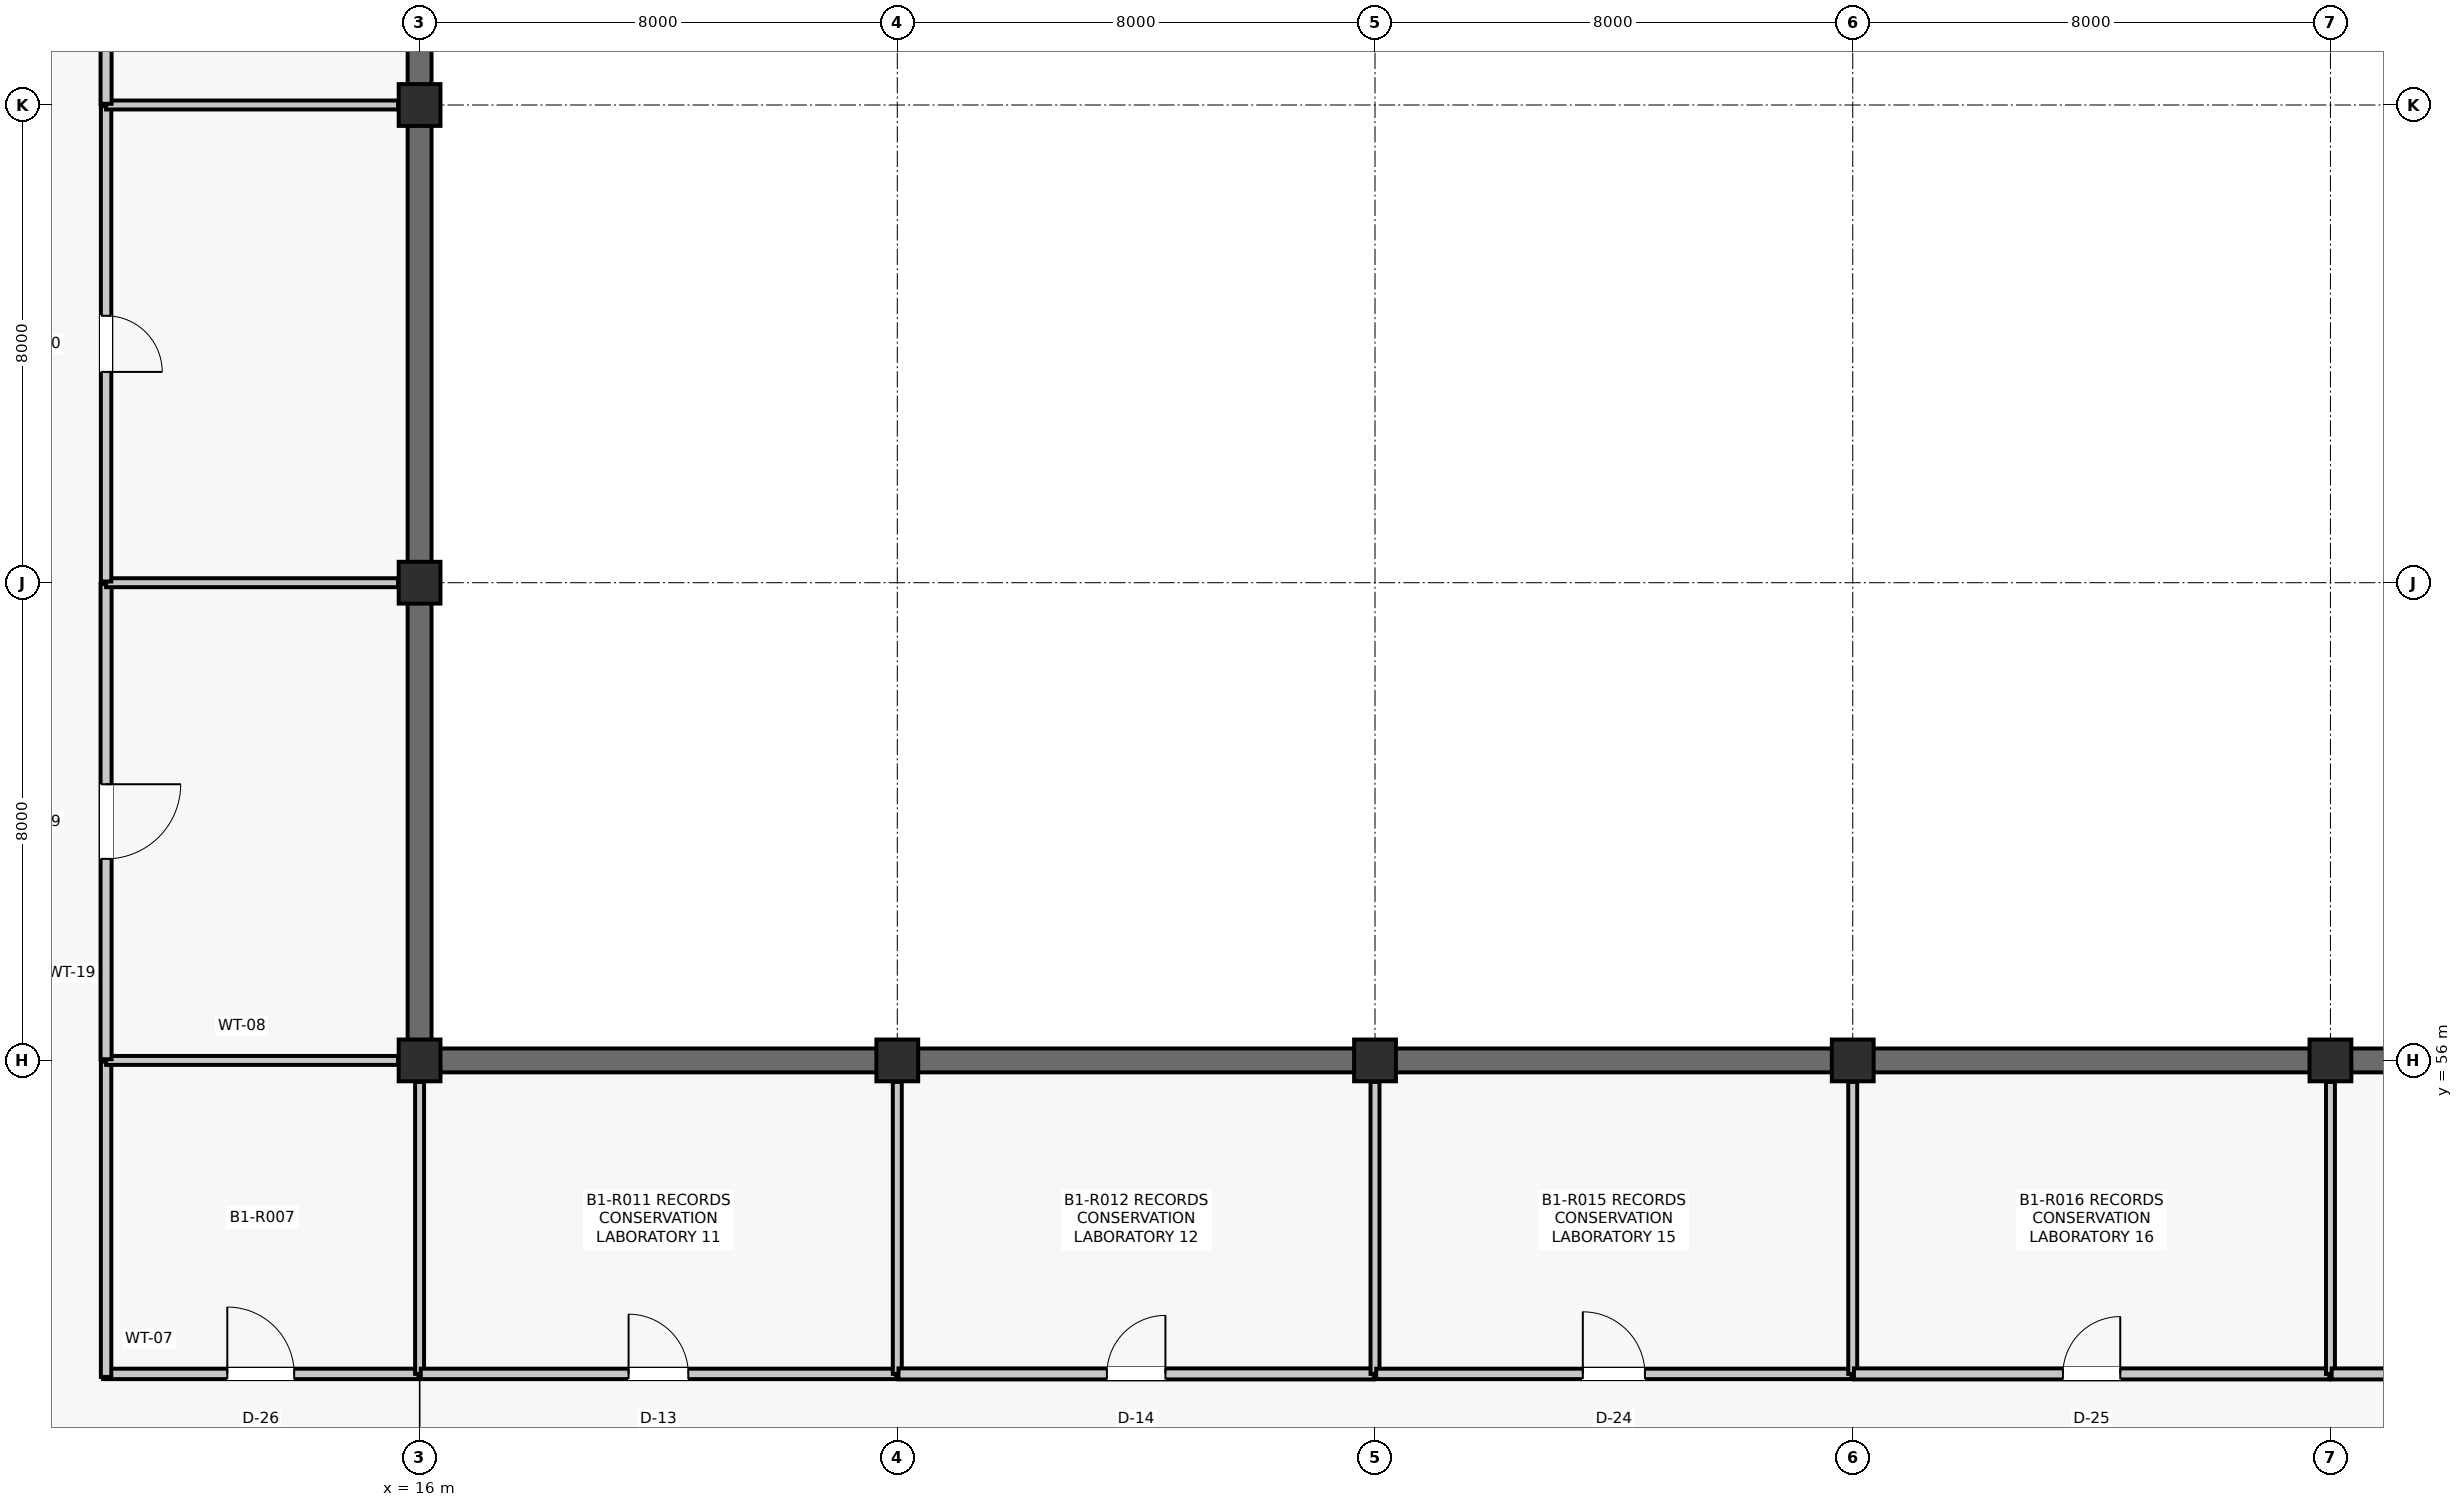
"""IFC4 building model, lengths in metres.
Left out: names, types, materials, properties, quantities, classifications, styles, units other than length and angle.
Written with IfcOpenShell. Run it as: python <this file> out.ifc"""

import sys

from ifc_helpers import new_model, si_unit, direction, frame, frame_2d, origin, origin_2d, place, context, subcontext, project, spatial, rectangle, extrude, element, fill, save


model = new_model("IFC4")
c1 = context("Model", 3, precision=1e-05, world=origin(), true_north=direction((0.0, 1.0)))
c2 = subcontext(c1, "Body", "Model", "MODEL_VIEW")
j1 = project(units=[si_unit("LENGTHUNIT", "METRE"), si_unit("PLANEANGLEUNIT", "RADIAN")], contexts=[c1])
p1 = place(None, origin())
s1 = spatial("IfcSite", under=j1, at=p1, CompositionType="ELEMENT")
p2 = place(p1, origin())
s2 = spatial("IfcBuilding", under=s1, at=p2, CompositionType="ELEMENT")
p3 = place(p2, frame((0.0, 0.0, -4.29)))
s3 = spatial("IfcBuildingStorey", under=s2, at=p3, CompositionType="ELEMENT", Elevation=-4.29)
for number, where, z_axis, x_axis in (
    (1, (16.0, 56.0, 0.0), (0.0, 0.0, 1.0), (1.0, 0.0, 0.0)),
    (2, (16.0, 64.0, 0.0), (0.0, 0.0, 1.0), (1.0, 0.0, 0.0)),
    (3, (16.0, 72.0, 0.0), (0.0, 0.0, 1.0), (1.0, 0.0, 0.0)),
    (4, (24.0, 56.0, 0.0), (0.0, 0.0, 1.0), (1.0, 0.0, 0.0)),
    (5, (32.0, 56.0, 0.0), (0.0, 0.0, 1.0), (1.0, 0.0, 0.0)),
    (6, (40.0, 56.0, 0.0), (0.0, 0.0, 1.0), (1.0, 0.0, 0.0)),
    (7, (48.0, 56.0, 0.0), (0.0, 0.0, 1.0), (1.0, 0.0, 0.0)),
):
    element("IfcColumn", number, at=place(p3, frame(where, z_axis=z_axis, x_axis=x_axis)), inside=s3, PredefinedType="COLUMN", context=c2, shape_type="SweptSolid", body=[
        extrude(rectangle(XDim=0.7, YDim=0.7, at=origin_2d()), origin(), (0.0, 0.0, 1.0), 4.29),
    ])
p4 = place(p3, frame((16.0, 56.335, 0.0), z_axis=(0.0, 0.0, 1.0), x_axis=(0.0, 1.0, 0.0)))
e8 = element("IfcWall", 8, at=p4, inside=s3, PredefinedType="SHEAR", context=c2, shape_type="SweptSolid", body=[
    extrude(rectangle(XDim=7.33, YDim=0.4, at=frame_2d((3.665, 0.0))), origin(), (0.0, 0.0, 1.0), 3.6),
])
p5 = place(p3, frame((16.0, 64.335, 0.0), z_axis=(0.0, 0.0, 1.0), x_axis=(0.0, 1.0, 0.0)))
e9 = element("IfcWall", 9, at=p5, inside=s3, PredefinedType="SHEAR", context=c2, shape_type="SweptSolid", body=[
    extrude(rectangle(XDim=7.33, YDim=0.4, at=frame_2d((3.665, 0.0))), origin(), (0.0, 0.0, 1.0), 3.664),
])
p6 = place(p3, frame((16.0, 72.335, 0.0), z_axis=(0.0, 0.0, 1.0), x_axis=(0.0, 1.0, 0.0)))
e10 = element("IfcWall", 10, at=p6, inside=s3, PredefinedType="SHEAR", context=c2, shape_type="SweptSolid", body=[
    extrude(rectangle(XDim=7.33, YDim=0.4, at=frame_2d((3.665, 0.0))), origin(), (0.0, 0.0, 1.0), 3.604),
])
p7 = place(p3, frame((16.335, 56.0, 0.0), z_axis=(0.0, 0.0, 1.0), x_axis=(1.0, 0.0, 0.0)))
e11 = element("IfcWall", 11, at=p7, inside=s3, PredefinedType="SHEAR", context=c2, shape_type="SweptSolid", body=[
    extrude(rectangle(XDim=7.33, YDim=0.4, at=frame_2d((3.665, 0.0))), origin(), (0.0, 0.0, 1.0), 3.6),
])
p8 = place(p3, frame((24.335, 56.0, 0.0), z_axis=(0.0, 0.0, 1.0), x_axis=(1.0, 0.0, 0.0)))
e12 = element("IfcWall", 12, at=p8, inside=s3, PredefinedType="SHEAR", context=c2, shape_type="SweptSolid", body=[
    extrude(rectangle(XDim=7.33, YDim=0.4, at=frame_2d((3.665, 0.0))), origin(), (0.0, 0.0, 1.0), 3.664),
])
p9 = place(p3, frame((32.335, 56.0, 0.0), z_axis=(0.0, 0.0, 1.0), x_axis=(1.0, 0.0, 0.0)))
e13 = element("IfcWall", 13, at=p9, inside=s3, PredefinedType="SHEAR", context=c2, shape_type="SweptSolid", body=[
    extrude(rectangle(XDim=7.33, YDim=0.4, at=frame_2d((3.665, 0.0))), origin(), (0.0, 0.0, 1.0), 3.604),
])
p10 = place(p3, frame((40.335, 56.0, 0.0), z_axis=(0.0, 0.0, 1.0), x_axis=(1.0, 0.0, 0.0)))
e14 = element("IfcWall", 14, at=p10, inside=s3, PredefinedType="SHEAR", context=c2, shape_type="SweptSolid", body=[
    extrude(rectangle(XDim=7.33, YDim=0.4, at=frame_2d((3.665, 0.0))), origin(), (0.0, 0.0, 1.0), 3.667),
])
p11 = place(p3, frame((48.335, 56.0, 0.0), z_axis=(0.0, 0.0, 1.0), x_axis=(1.0, 0.0, 0.0)))
e15 = element("IfcWall", 15, at=p11, inside=s3, PredefinedType="SHEAR", context=c2, shape_type="SweptSolid", body=[
    extrude(rectangle(XDim=7.33, YDim=0.4, at=frame_2d((3.665, 0.0))), origin(), (0.0, 0.0, 1.0), 3.6),
])
p12 = place(p3, frame((10.7, 50.75, 0.0), z_axis=(0.0, 0.0, 1.0), x_axis=(1.0, 0.0, 0.0)))
e16 = element("IfcWall", 16, at=p12, inside=s3, PredefinedType="PARTITIONING", context=c2, shape_type="SweptSolid", body=[
    extrude(rectangle(XDim=5.28, YDim=0.175, at=frame_2d((2.64, 0.0))), origin(), (0.0, 0.0, 1.0), 3.393),
])
p13 = place(p12, frame((2.08, 0.0, 0.0)))
e17 = element("IfcOpeningElement", 17, at=p13, cuts=e16, PredefinedType="OPENING", context=c2, shape_type="SweptSolid", body=[
    extrude(rectangle(XDim=1.12, YDim=2.22, at=frame_2d((0.56, 1.11))), frame((0.0, 0.097, 0.0), z_axis=(0.0, -1.0, 0.0), x_axis=(1.0, 0.0, 0.0)), (0.0, 0.0, 1.0), 0.195),
])
p14 = place(p3, frame((10.75, 50.7, 0.0), z_axis=(0.0, 0.0, 1.0), x_axis=(0.0, 1.0, 0.0)))
e18 = element("IfcWall", 18, at=p14, inside=s3, PredefinedType="PARTITIONING", context=c2, shape_type="SweptSolid", body=[
    extrude(rectangle(XDim=5.28, YDim=0.175, at=frame_2d((2.64, 0.0))), origin(), (0.0, 0.0, 1.0), 3.317),
])
p15 = place(p3, frame((10.75, 56.0, 0.0), z_axis=(0.0, 0.0, 1.0), x_axis=(1.0, 0.0, 0.0)))
e19 = element("IfcWall", 19, at=p15, inside=s3, PredefinedType="PARTITIONING", context=c2, shape_type="SweptSolid", body=[
    extrude(rectangle(XDim=4.89, YDim=0.15, at=frame_2d((2.445, 0.0))), origin(), (0.0, 0.0, 1.0), 3.317),
])
p16 = place(p3, frame((16.0, 50.75, 0.0), z_axis=(0.0, 0.0, 1.0), x_axis=(0.0, 1.0, 0.0)))
e20 = element("IfcWall", 20, at=p16, inside=s3, PredefinedType="PARTITIONING", context=c2, shape_type="SweptSolid", body=[
    extrude(rectangle(XDim=4.89, YDim=0.15, at=frame_2d((2.445, 0.0))), origin(), (0.0, 0.0, 1.0), 3.393),
])
p17 = place(p3, frame((10.75, 56.02, 0.0), z_axis=(0.0, 0.0, 1.0), x_axis=(0.0, 1.0, 0.0)))
e21 = element("IfcWall", 21, at=p17, inside=s3, PredefinedType="PARTITIONING", context=c2, shape_type="SweptSolid", body=[
    extrude(rectangle(XDim=7.96, YDim=0.185, at=frame_2d((3.98, 0.0))), origin(), (0.0, 0.0, 1.0), 3.317),
])
p18 = place(p17, frame((3.355, 0.0, 0.0)))
e22 = element("IfcOpeningElement", 22, at=p18, cuts=e21, PredefinedType="OPENING", context=c2, shape_type="SweptSolid", body=[
    extrude(rectangle(XDim=1.25, YDim=2.18, at=frame_2d((0.625, 1.09))), frame((0.0, 0.103, 0.0), z_axis=(0.0, -1.0, 0.0), x_axis=(1.0, 0.0, 0.0)), (0.0, 0.0, 1.0), 0.205),
])
p19 = place(p3, frame((10.75, 64.0, 0.0), z_axis=(0.0, 0.0, 1.0), x_axis=(1.0, 0.0, 0.0)))
e23 = element("IfcWall", 23, at=p19, inside=s3, PredefinedType="PARTITIONING", context=c2, shape_type="SweptSolid", body=[
    extrude(rectangle(XDim=4.89, YDim=0.15, at=frame_2d((2.445, 0.0))), origin(), (0.0, 0.0, 1.0), 3.393),
])
p20 = place(p3, frame((10.75, 64.02, 0.0), z_axis=(0.0, 0.0, 1.0), x_axis=(0.0, 1.0, 0.0)))
e24 = element("IfcWall", 24, at=p20, inside=s3, PredefinedType="PARTITIONING", context=c2, shape_type="SweptSolid", body=[
    extrude(rectangle(XDim=7.96, YDim=0.175, at=frame_2d((3.98, 0.0))), origin(), (0.0, 0.0, 1.0), 3.326),
])
p21 = place(p20, frame((3.51, 0.0, 0.0)))
e25 = element("IfcOpeningElement", 25, at=p21, cuts=e24, PredefinedType="OPENING", context=c2, shape_type="SweptSolid", body=[
    extrude(rectangle(XDim=0.94, YDim=2.12, at=frame_2d((0.47, 1.06))), frame((0.0, 0.097, 0.0), z_axis=(0.0, -1.0, 0.0), x_axis=(1.0, 0.0, 0.0)), (0.0, 0.0, 1.0), 0.195),
])
p22 = place(p3, frame((10.75, 72.0, 0.0), z_axis=(0.0, 0.0, 1.0), x_axis=(1.0, 0.0, 0.0)))
e26 = element("IfcWall", 26, at=p22, inside=s3, PredefinedType="PARTITIONING", context=c2, shape_type="SweptSolid", body=[
    extrude(rectangle(XDim=4.89, YDim=0.15, at=frame_2d((2.445, 0.0))), origin(), (0.0, 0.0, 1.0), 3.326),
])
p23 = place(p3, frame((10.75, 72.02, 0.0), z_axis=(0.0, 0.0, 1.0), x_axis=(0.0, 1.0, 0.0)))
e27 = element("IfcWall", 27, at=p23, inside=s3, PredefinedType="PARTITIONING", context=c2, shape_type="SweptSolid", body=[
    extrude(rectangle(XDim=7.96, YDim=0.185, at=frame_2d((3.98, 0.0))), origin(), (0.0, 0.0, 1.0), 3.326),
])
p24 = place(p23, frame((3.455, 0.0, 0.0)))
e28 = element("IfcOpeningElement", 28, at=p24, cuts=e27, PredefinedType="OPENING", context=c2, shape_type="SweptSolid", body=[
    extrude(rectangle(XDim=1.05, YDim=2.15, at=frame_2d((0.525, 1.075))), frame((0.0, 0.103, 0.0), z_axis=(0.0, -1.0, 0.0), x_axis=(1.0, 0.0, 0.0)), (0.0, 0.0, 1.0), 0.205),
])
p25 = place(p3, frame((16.02, 50.75, 0.0), z_axis=(0.0, 0.0, 1.0), x_axis=(1.0, 0.0, 0.0)))
e29 = element("IfcWall", 29, at=p25, inside=s3, PredefinedType="PARTITIONING", context=c2, shape_type="SweptSolid", body=[
    extrude(rectangle(XDim=7.96, YDim=0.175, at=frame_2d((3.98, 0.0))), origin(), (0.0, 0.0, 1.0), 3.393),
])
p26 = place(p25, frame((3.48, 0.0, 0.0)))
e30 = element("IfcOpeningElement", 30, at=p26, cuts=e29, PredefinedType="OPENING", context=c2, shape_type="SweptSolid", body=[
    extrude(rectangle(XDim=1.0, YDim=2.15, at=frame_2d((0.5, 1.075))), frame((0.0, 0.097, 0.0), z_axis=(0.0, -1.0, 0.0), x_axis=(1.0, 0.0, 0.0)), (0.0, 0.0, 1.0), 0.195),
])
p27 = place(p3, frame((24.0, 50.75, 0.0), z_axis=(0.0, 0.0, 1.0), x_axis=(0.0, 1.0, 0.0)))
e31 = element("IfcWall", 31, at=p27, inside=s3, PredefinedType="PARTITIONING", context=c2, shape_type="SweptSolid", body=[
    extrude(rectangle(XDim=4.89, YDim=0.15, at=frame_2d((2.445, 0.0))), origin(), (0.0, 0.0, 1.0), 3.402),
])
p28 = place(p3, frame((24.02, 50.75, 0.0), z_axis=(0.0, 0.0, 1.0), x_axis=(1.0, 0.0, 0.0)))
e32 = element("IfcWall", 32, at=p28, inside=s3, PredefinedType="PARTITIONING", context=c2, shape_type="SweptSolid", body=[
    extrude(rectangle(XDim=7.96, YDim=0.185, at=frame_2d((3.98, 0.0))), origin(), (0.0, 0.0, 1.0), 3.394),
])
p29 = place(p28, frame((3.49, 0.0, 0.0)))
e33 = element("IfcOpeningElement", 33, at=p29, cuts=e32, PredefinedType="OPENING", context=c2, shape_type="SweptSolid", body=[
    extrude(rectangle(XDim=0.98, YDim=2.15, at=frame_2d((0.49, 1.075))), frame((0.0, 0.103, 0.0), z_axis=(0.0, -1.0, 0.0), x_axis=(1.0, 0.0, 0.0)), (0.0, 0.0, 1.0), 0.205),
])
p30 = place(p3, frame((32.0, 50.75, 0.0), z_axis=(0.0, 0.0, 1.0), x_axis=(0.0, 1.0, 0.0)))
e34 = element("IfcWall", 34, at=p30, inside=s3, PredefinedType="PARTITIONING", context=c2, shape_type="SweptSolid", body=[
    extrude(rectangle(XDim=4.89, YDim=0.15, at=frame_2d((2.445, 0.0))), origin(), (0.0, 0.0, 1.0), 3.394),
])
p31 = place(p3, frame((32.02, 50.75, 0.0), z_axis=(0.0, 0.0, 1.0), x_axis=(1.0, 0.0, 0.0)))
e35 = element("IfcWall", 35, at=p31, inside=s3, PredefinedType="PARTITIONING", context=c2, shape_type="SweptSolid", body=[
    extrude(rectangle(XDim=7.96, YDim=0.175, at=frame_2d((3.98, 0.0))), origin(), (0.0, 0.0, 1.0), 3.394),
])
p32 = place(p31, frame((3.46, 0.0, 0.0)))
e36 = element("IfcOpeningElement", 36, at=p32, cuts=e35, PredefinedType="OPENING", context=c2, shape_type="SweptSolid", body=[
    extrude(rectangle(XDim=1.04, YDim=2.18, at=frame_2d((0.52, 1.09))), frame((0.0, 0.097, 0.0), z_axis=(0.0, -1.0, 0.0), x_axis=(1.0, 0.0, 0.0)), (0.0, 0.0, 1.0), 0.195),
])
p33 = place(p3, frame((40.0, 50.75, 0.0), z_axis=(0.0, 0.0, 1.0), x_axis=(0.0, 1.0, 0.0)))
e37 = element("IfcWall", 37, at=p33, inside=s3, PredefinedType="PARTITIONING", context=c2, shape_type="SweptSolid", body=[
    extrude(rectangle(XDim=4.89, YDim=0.15, at=frame_2d((2.445, 0.0))), origin(), (0.0, 0.0, 1.0), 3.461),
])
p34 = place(p3, frame((40.02, 50.75, 0.0), z_axis=(0.0, 0.0, 1.0), x_axis=(1.0, 0.0, 0.0)))
e38 = element("IfcWall", 38, at=p34, inside=s3, PredefinedType="PARTITIONING", context=c2, shape_type="SweptSolid", body=[
    extrude(rectangle(XDim=7.96, YDim=0.185, at=frame_2d((3.98, 0.0))), origin(), (0.0, 0.0, 1.0), 3.393),
])
p35 = place(p34, frame((3.5, 0.0, 0.0)))
e39 = element("IfcOpeningElement", 39, at=p35, cuts=e38, PredefinedType="OPENING", context=c2, shape_type="SweptSolid", body=[
    extrude(rectangle(XDim=0.96, YDim=2.14, at=frame_2d((0.48, 1.07))), frame((0.0, 0.103, 0.0), z_axis=(0.0, -1.0, 0.0), x_axis=(1.0, 0.0, 0.0)), (0.0, 0.0, 1.0), 0.205),
])
p36 = place(p3, frame((48.0, 50.75, 0.0), z_axis=(0.0, 0.0, 1.0), x_axis=(0.0, 1.0, 0.0)))
e40 = element("IfcWall", 40, at=p36, inside=s3, PredefinedType="PARTITIONING", context=c2, shape_type="SweptSolid", body=[
    extrude(rectangle(XDim=4.89, YDim=0.15, at=frame_2d((2.445, 0.0))), origin(), (0.0, 0.0, 1.0), 3.393),
])
p37 = place(p3, frame((48.02, 50.75, 0.0), z_axis=(0.0, 0.0, 1.0), x_axis=(1.0, 0.0, 0.0)))
e41 = element("IfcWall", 41, at=p37, inside=s3, PredefinedType="PARTITIONING", context=c2, shape_type="SweptSolid", body=[
    extrude(rectangle(XDim=7.96, YDim=0.185, at=frame_2d((3.98, 0.0))), origin(), (0.0, 0.0, 1.0), 3.393),
])
p38 = place(p37, frame((3.355, 0.0, 0.0)))
e42 = element("IfcOpeningElement", 42, at=p38, cuts=e41, PredefinedType="OPENING", context=c2, shape_type="SweptSolid", body=[
    extrude(rectangle(XDim=1.25, YDim=2.18, at=frame_2d((0.625, 1.09))), frame((0.0, 0.103, 0.0), z_axis=(0.0, -1.0, 0.0), x_axis=(1.0, 0.0, 0.0)), (0.0, 0.0, 1.0), 0.205),
])
p39 = place(p13, origin())
e43 = element("IfcDoor", 43, at=p39, inside=s3, OperationType="SINGLE_SWING_LEFT", PredefinedType="DOOR", context=c2, shape_type="SweptSolid", body=[
    extrude(rectangle(XDim=1.12, YDim=2.22, at=frame_2d((0.56, 1.11))), frame((0.0, 0.025, 0.0), z_axis=(0.0, -1.0, 0.0), x_axis=(1.0, 0.0, 0.0)), (0.0, 0.0, 1.0), 0.05),
])
fill(e17, e43)
p40 = place(p18, frame((1.25, 0.0, 0.0), z_axis=(0.0, 0.0, 1.0), x_axis=(-1.0, 0.0, 0.0)))
e44 = element("IfcDoor", 44, at=p40, inside=s3, OperationType="SINGLE_SWING_RIGHT", PredefinedType="DOOR", context=c2, shape_type="SweptSolid", body=[
    extrude(rectangle(XDim=1.25, YDim=2.18, at=frame_2d((0.625, 1.09))), frame((0.0, 0.025, 0.0), z_axis=(0.0, -1.0, 0.0), x_axis=(1.0, 0.0, 0.0)), (0.0, 0.0, 1.0), 0.05),
])
fill(e22, e44)
p41 = place(p21, frame((0.94, 0.0, 0.0), z_axis=(0.0, 0.0, 1.0), x_axis=(-1.0, 0.0, 0.0)))
e45 = element("IfcDoor", 45, at=p41, inside=s3, OperationType="SINGLE_SWING_LEFT", PredefinedType="DOOR", context=c2, shape_type="SweptSolid", body=[
    extrude(rectangle(XDim=0.94, YDim=2.12, at=frame_2d((0.47, 1.06))), frame((0.0, 0.025, 0.0), z_axis=(0.0, -1.0, 0.0), x_axis=(1.0, 0.0, 0.0)), (0.0, 0.0, 1.0), 0.05),
])
fill(e25, e45)
p42 = place(p26, origin())
e46 = element("IfcDoor", 46, at=p42, inside=s3, OperationType="SINGLE_SWING_LEFT", PredefinedType="DOOR", context=c2, shape_type="SweptSolid", body=[
    extrude(rectangle(XDim=1.0, YDim=2.15, at=frame_2d((0.5, 1.075))), frame((0.0, 0.025, 0.0), z_axis=(0.0, -1.0, 0.0), x_axis=(1.0, 0.0, 0.0)), (0.0, 0.0, 1.0), 0.05),
])
fill(e30, e46)
p43 = place(p29, origin())
e47 = element("IfcDoor", 47, at=p43, inside=s3, OperationType="SINGLE_SWING_RIGHT", PredefinedType="DOOR", context=c2, shape_type="SweptSolid", body=[
    extrude(rectangle(XDim=0.98, YDim=2.15, at=frame_2d((0.49, 1.075))), frame((0.0, 0.025, 0.0), z_axis=(0.0, -1.0, 0.0), x_axis=(1.0, 0.0, 0.0)), (0.0, 0.0, 1.0), 0.05),
])
fill(e33, e47)
p44 = place(p32, origin())
e48 = element("IfcDoor", 48, at=p44, inside=s3, OperationType="SINGLE_SWING_LEFT", PredefinedType="DOOR", context=c2, shape_type="SweptSolid", body=[
    extrude(rectangle(XDim=1.04, YDim=2.18, at=frame_2d((0.52, 1.09))), frame((0.0, 0.025, 0.0), z_axis=(0.0, -1.0, 0.0), x_axis=(1.0, 0.0, 0.0)), (0.0, 0.0, 1.0), 0.05),
])
fill(e36, e48)
p45 = place(p35, origin())
e49 = element("IfcDoor", 49, at=p45, inside=s3, OperationType="SINGLE_SWING_RIGHT", PredefinedType="DOOR", context=c2, shape_type="SweptSolid", body=[
    extrude(rectangle(XDim=0.96, YDim=2.14, at=frame_2d((0.48, 1.07))), frame((0.0, 0.025, 0.0), z_axis=(0.0, -1.0, 0.0), x_axis=(1.0, 0.0, 0.0)), (0.0, 0.0, 1.0), 0.05),
])
fill(e39, e49)
save(model, sys.argv[1])
